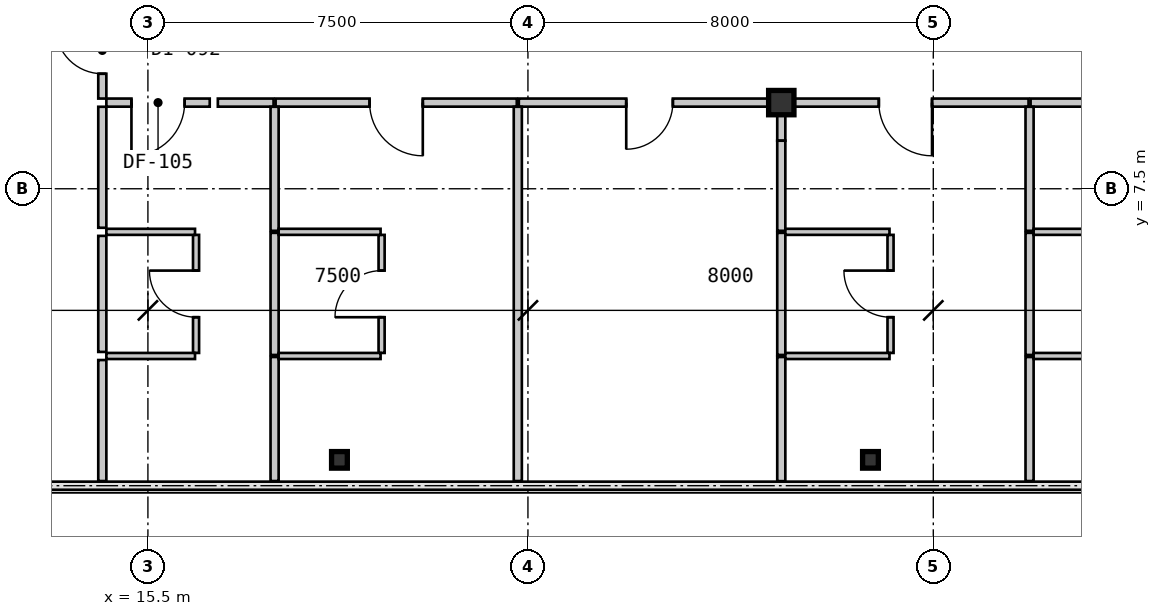
"""IFC4 building model, lengths in metres.
Left out: names, types, materials, properties, quantities, classifications, styles, units other than length and angle.
Written with IfcOpenShell. Run it as: python <this file> out.ifc"""

import sys

from ifc_helpers import new_model, si_unit, direction, frame, frame_2d, origin, origin_2d, place, context, subcontext, project, spatial, rectangle, i_section, extrude, source, transform, mapped, element, fill, save


model = new_model("IFC4")
c1 = context("Model", 3, precision=1e-05, world=origin(), true_north=direction((0.0, 1.0)))
c2 = subcontext(c1, "Body", "Model", "MODEL_VIEW")
j1 = project(units=[si_unit("LENGTHUNIT", "METRE"), si_unit("PLANEANGLEUNIT", "RADIAN")], contexts=[c1])
p1 = place(None, origin())
s1 = spatial("IfcSite", under=j1, at=p1, CompositionType="ELEMENT")
p2 = place(p1, origin())
s2 = spatial("IfcBuilding", under=s1, at=p2, CompositionType="ELEMENT")
p3 = place(p2, frame((0.0, 0.0, 19.95)))
s3 = spatial("IfcBuildingStorey", under=s2, at=p3, CompositionType="ELEMENT", Elevation=19.95)
m1 = source(origin(), c2, "Body", "SweptSolid", [
    extrude(i_section(OverallWidth=0.5, OverallDepth=0.48, WebThickness=0.028, FlangeThickness=0.044, at=origin_2d()), origin(), (0.0, 0.0, 1.0), 3.15),
])
p4 = place(p3, frame((28.0, 9.2, 0.0), z_axis=(0.0, 0.0, 1.0), x_axis=(1.0, 0.0, 0.0)))
e1 = element("IfcColumn", 1, at=p4, inside=s3, PredefinedType="COLUMN", context=c2, shape_type="MappedRepresentation", body=[
    mapped(m1, transform((0.0, 0.0, 0.0), scale=1.0)),
])
m2 = source(origin(), c2, "Body", "SweptSolid", [
    extrude(i_section(OverallWidth=0.311, OverallDepth=0.327, WebThickness=0.016, FlangeThickness=0.025, at=origin_2d()), origin(), (0.0, 0.0, 1.0), 3.15),
])
for number, where, z_axis, x_axis in (
    (2, (19.28, 2.15, 0.0), (0.0, 0.0, 1.0), (1.0, 0.0, 0.0)),
    (3, (29.76, 2.15, 0.0), (0.0, 0.0, 1.0), (1.0, 0.0, 0.0)),
):
    element("IfcColumn", number, at=place(p3, frame(where, z_axis=z_axis, x_axis=x_axis)), inside=s3, PredefinedType="COLUMN", context=c2, shape_type="MappedRepresentation", body=[
        mapped(m2, transform((0.0, 0.0, 0.0), scale=1.0)),
    ])
m3 = source(origin(), c2, "Body", "SweptSolid", [
    extrude(rectangle(XDim=2.04, YDim=0.16, at=frame_2d((1.02, 0.0))), origin(), (0.0, 0.0, 1.0), 2.93),
])
p5 = place(p3, frame((16.72, 9.2, 0.0), z_axis=(0.0, 0.0, 1.0), x_axis=(-1.0, 0.0, 0.0)))
e4 = element("IfcWall", 4, at=p5, inside=s3, PredefinedType="PARTITIONING", context=c2, shape_type="MappedRepresentation", body=[
    mapped(m3, transform((0.0, 0.0, 0.0), scale=1.0)),
])
m4 = source(origin(), c2, "Body", "SweptSolid", [
    extrude(rectangle(XDim=1.05, YDim=2.1, at=frame_2d((0.525, 1.05))), frame((0.0, 0.09, 0.0), z_axis=(0.0, -1.0, 0.0), x_axis=(1.0, 0.0, 0.0)), (0.0, 0.0, 1.0), 0.18),
])
p6 = place(p5, frame((0.495, 0.0, 0.0)))
e5 = element("IfcOpeningElement", 5, at=p6, cuts=e4, PredefinedType="OPENING", context=c2, shape_type="MappedRepresentation", body=[
    mapped(m4, transform((0.0, 0.0, 0.0), scale=1.0)),
])
m5 = source(origin(), c2, "Body", "SweptSolid", [
    extrude(rectangle(XDim=1.9, YDim=0.16, at=frame_2d((0.95, 0.0))), origin(), (0.0, 0.0, 1.0), 2.93),
])
p7 = place(p3, frame((14.6, 9.28, 0.0), z_axis=(0.0, 0.0, 1.0), x_axis=(0.0, 1.0, 0.0)))
e6 = element("IfcWall", 6, at=p7, inside=s3, PredefinedType="PARTITIONING", context=c2, shape_type="MappedRepresentation", body=[
    mapped(m5, transform((0.0, 0.0, 0.0), scale=1.0)),
])
m6 = source(origin(), c2, "Body", "SweptSolid", [
    extrude(rectangle(XDim=0.92, YDim=2.1, at=frame_2d((0.46, 1.05))), frame((0.0, 0.09, 0.0), z_axis=(0.0, -1.0, 0.0), x_axis=(1.0, 0.0, 0.0)), (0.0, 0.0, 1.0), 0.18),
])
p8 = place(p7, frame((0.49, 0.0, 0.0)))
e7 = element("IfcOpeningElement", 7, at=p8, cuts=e6, PredefinedType="OPENING", context=c2, shape_type="MappedRepresentation", body=[
    mapped(m6, transform((0.0, 0.0, 0.0), scale=1.0)),
])
m7 = source(origin(), c2, "Body", "SweptSolid", [
    extrude(rectangle(XDim=1.1, YDim=0.16, at=frame_2d((0.55, 0.0))), origin(), (0.0, 0.0, 1.0), 2.93),
])
p9 = place(p3, frame((17.98, 9.2, 0.0), z_axis=(0.0, 0.0, 1.0), x_axis=(-1.0, 0.0, 0.0)))
e8 = element("IfcWall", 8, at=p9, inside=s3, PredefinedType="PARTITIONING", context=c2, shape_type="MappedRepresentation", body=[
    mapped(m7, transform((0.0, 0.0, 0.0), scale=1.0)),
])
m8 = source(origin(), c2, "Body", "SweptSolid", [
    extrude(rectangle(XDim=4.76, YDim=0.16, at=frame_2d((2.38, 0.0))), origin(), (0.0, 0.0, 1.0), 2.93),
])
p10 = place(p3, frame((22.78, 9.2, 0.0), z_axis=(0.0, 0.0, 1.0), x_axis=(-1.0, 0.0, 0.0)))
e9 = element("IfcWall", 9, at=p10, inside=s3, PredefinedType="PARTITIONING", context=c2, shape_type="MappedRepresentation", body=[
    mapped(m8, transform((0.0, 0.0, 0.0), scale=1.0)),
])
p11 = place(p10, frame((1.855, 0.0, 0.0)))
e10 = element("IfcOpeningElement", 10, at=p11, cuts=e9, PredefinedType="OPENING", context=c2, shape_type="MappedRepresentation", body=[
    mapped(m4, transform((0.0, 0.0, 0.0), scale=1.0)),
])
m9 = source(origin(), c2, "Body", "SweptSolid", [
    extrude(rectangle(XDim=5.159, YDim=0.16, at=frame_2d((2.58, 0.0))), origin(), (0.0, 0.0, 1.0), 2.93),
])
p12 = place(p3, frame((27.98, 9.2, 0.0), z_axis=(0.0, 0.0, 1.0), x_axis=(-1.0, 0.0, 0.0)))
e11 = element("IfcWall", 11, at=p12, inside=s3, PredefinedType="PARTITIONING", context=c2, shape_type="MappedRepresentation", body=[
    mapped(m9, transform((0.0, 0.0, 0.0), scale=1.0)),
])
p13 = place(p12, frame((2.12, 0.0, 0.0)))
e12 = element("IfcOpeningElement", 12, at=p13, cuts=e11, PredefinedType="OPENING", context=c2, shape_type="MappedRepresentation", body=[
    mapped(m6, transform((0.0, 0.0, 0.0), scale=1.0)),
])
m10 = source(origin(), c2, "Body", "SweptSolid", [
    extrude(rectangle(XDim=4.859, YDim=0.16, at=frame_2d((2.43, 0.0))), origin(), (0.0, 0.0, 1.0), 2.328),
])
p14 = place(p3, frame((32.88, 9.2, 0.0), z_axis=(0.0, 0.0, 1.0), x_axis=(-1.0, 0.0, 0.0)))
e13 = element("IfcWall", 13, at=p14, inside=s3, PredefinedType="PARTITIONING", context=c2, shape_type="MappedRepresentation", body=[
    mapped(m10, transform((0.0, 0.0, 0.0), scale=1.0)),
])
p15 = place(p14, frame((1.905, 0.0, 0.0)))
e14 = element("IfcOpeningElement", 14, at=p15, cuts=e13, PredefinedType="OPENING", context=c2, shape_type="MappedRepresentation", body=[
    mapped(m4, transform((0.0, 0.0, 0.0), scale=1.0)),
])
m11 = source(origin(), c2, "Body", "SweptSolid", [
    extrude(rectangle(XDim=4.659, YDim=0.16, at=frame_2d((2.33, 0.0))), origin(), (0.0, 0.0, 1.0), 2.328),
])
p16 = place(p3, frame((37.58, 9.2, 0.0), z_axis=(0.0, 0.0, 1.0), x_axis=(-1.0, 0.0, 0.0)))
e15 = element("IfcWall", 15, at=p16, inside=s3, PredefinedType="PARTITIONING", context=c2, shape_type="MappedRepresentation", body=[
    mapped(m11, transform((0.0, 0.0, 0.0), scale=1.0)),
])
p17 = place(p16, frame((1.805, 0.0, 0.0)))
e16 = element("IfcOpeningElement", 16, at=p17, cuts=e15, PredefinedType="OPENING", context=c2, shape_type="MappedRepresentation", body=[
    mapped(m4, transform((0.0, 0.0, 0.0), scale=1.0)),
])
m12 = source(origin(), c2, "Body", "SweptSolid", [
    extrude(rectangle(XDim=2.33, YDim=0.12, at=frame_2d((1.165, 0.0))), origin(), (0.0, 0.0, 1.0), 2.93),
])
p18 = place(p3, frame((16.45, 4.26, 0.0), z_axis=(0.0, 0.0, 1.0), x_axis=(0.0, 1.0, 0.0)))
e17 = element("IfcWall", 17, at=p18, inside=s3, PredefinedType="PARTITIONING", context=c2, shape_type="MappedRepresentation", body=[
    mapped(m12, transform((0.0, 0.0, 0.0), scale=1.0)),
])
m13 = source(origin(), c2, "Body", "SweptSolid", [
    extrude(rectangle(XDim=0.92, YDim=2.1, at=frame_2d((0.46, 1.05))), frame((0.0, 0.07, 0.0), z_axis=(0.0, -1.0, 0.0), x_axis=(1.0, 0.0, 0.0)), (0.0, 0.0, 1.0), 0.14),
])
p19 = place(p18, frame((0.705, 0.0, 0.0)))
e18 = element("IfcOpeningElement", 18, at=p19, cuts=e17, PredefinedType="OPENING", context=c2, shape_type="MappedRepresentation", body=[
    mapped(m13, transform((0.0, 0.0, 0.0), scale=1.0)),
])
m14 = source(origin(), c2, "Body", "SweptSolid", [
    extrude(rectangle(XDim=1.75, YDim=0.12, at=frame_2d((0.875, 0.0))), origin(), (0.0, 0.0, 1.0), 2.93),
])
for number, where, z_axis, x_axis in (
    (19, (14.68, 4.2, 0.0), (0.0, 0.0, 1.0), (1.0, 0.0, 0.0)),
    (20, (16.43, 6.65, 0.0), (0.0, 0.0, 1.0), (-1.0, 0.0, 0.0)),
):
    element("IfcWall", number, at=place(p3, frame(where, z_axis=z_axis, x_axis=x_axis)), inside=s3, PredefinedType="PARTITIONING", context=c2, shape_type="MappedRepresentation", body=[
        mapped(m14, transform((0.0, 0.0, 0.0), scale=1.0)),
    ])
m15 = source(origin(), c2, "Body", "SweptSolid", [
    extrude(rectangle(XDim=2.448, YDim=0.16, at=frame_2d((1.224, 0.0))), origin(), (0.0, 0.0, 1.0), 2.93),
])
for number, where, z_axis, x_axis in (
    (21, (18.0, 4.18, 0.0), (0.0, 0.0, 1.0), (0.0, -1.0, 0.0)),
    (22, (18.0, 9.118, 0.0), (0.0, 0.0, 1.0), (0.0, -1.0, 0.0)),
):
    element("IfcWall", number, at=place(p3, frame(where, z_axis=z_axis, x_axis=x_axis)), inside=s3, PredefinedType="PARTITIONING", context=c2, shape_type="MappedRepresentation", body=[
        mapped(m15, transform((0.0, 0.0, 0.0), scale=1.0)),
    ])
m16 = source(origin(), c2, "Body", "SweptSolid", [
    extrude(rectangle(XDim=2.41, YDim=0.16, at=frame_2d((1.205, 0.0))), origin(), (0.0, 0.0, 1.0), 2.93),
])
p20 = place(p3, frame((18.0, 6.63, 0.0), z_axis=(0.0, 0.0, 1.0), x_axis=(0.0, -1.0, 0.0)))
e23 = element("IfcWall", 23, at=p20, inside=s3, PredefinedType="PARTITIONING", context=c2, shape_type="MappedRepresentation", body=[
    mapped(m16, transform((0.0, 0.0, 0.0), scale=1.0)),
])
m17 = source(origin(), c2, "Body", "SweptSolid", [
    extrude(rectangle(XDim=2.388, YDim=0.16, at=frame_2d((1.194, 0.0))), origin(), (0.0, 0.0, 1.0), 2.93),
])
p21 = place(p3, frame((14.6, 1.732, 0.0), z_axis=(0.0, 0.0, 1.0), x_axis=(0.0, 1.0, 0.0)))
e24 = element("IfcWall", 24, at=p21, inside=s3, PredefinedType="PARTITIONING", context=c2, shape_type="MappedRepresentation", body=[
    mapped(m17, transform((0.0, 0.0, 0.0), scale=1.0)),
])
m18 = source(origin(), c2, "Body", "SweptSolid", [
    extrude(rectangle(XDim=2.388, YDim=0.16, at=frame_2d((1.194, 0.0))), origin(), (0.0, 0.0, 1.0), 2.93),
])
p22 = place(p3, frame((14.6, 6.73, 0.0), z_axis=(0.0, 0.0, 1.0), x_axis=(0.0, 1.0, 0.0)))
e25 = element("IfcWall", 25, at=p22, inside=s3, PredefinedType="PARTITIONING", context=c2, shape_type="MappedRepresentation", body=[
    mapped(m18, transform((0.0, 0.0, 0.0), scale=1.0)),
])
m19 = source(origin(), c2, "Body", "SweptSolid", [
    extrude(rectangle(XDim=2.29, YDim=0.16, at=frame_2d((1.145, 0.0))), origin(), (0.0, 0.0, 1.0), 2.93),
])
p23 = place(p3, frame((14.6, 4.28, 0.0), z_axis=(0.0, 0.0, 1.0), x_axis=(0.0, 1.0, 0.0)))
e26 = element("IfcWall", 26, at=p23, inside=s3, PredefinedType="PARTITIONING", context=c2, shape_type="MappedRepresentation", body=[
    mapped(m19, transform((0.0, 0.0, 0.0), scale=1.0)),
])
p24 = place(p3, frame((20.112, 4.26, 0.0), z_axis=(0.0, 0.0, 1.0), x_axis=(0.0, 1.0, 0.0)))
e27 = element("IfcWall", 27, at=p24, inside=s3, PredefinedType="PARTITIONING", context=c2, shape_type="MappedRepresentation", body=[
    mapped(m12, transform((0.0, 0.0, 0.0), scale=1.0)),
])
p25 = place(p24, frame((0.705, 0.0, 0.0)))
e28 = element("IfcOpeningElement", 28, at=p25, cuts=e27, PredefinedType="OPENING", context=c2, shape_type="MappedRepresentation", body=[
    mapped(m13, transform((0.0, 0.0, 0.0), scale=1.0)),
])
m20 = source(origin(), c2, "Body", "SweptSolid", [
    extrude(rectangle(XDim=2.012, YDim=0.12, at=frame_2d((1.006, 0.0))), origin(), (0.0, 0.0, 1.0), 2.93),
])
for number, where, z_axis, x_axis in (
    (29, (18.08, 4.2, 0.0), (0.0, 0.0, 1.0), (1.0, 0.0, 0.0)),
    (30, (20.092, 6.65, 0.0), (0.0, 0.0, 1.0), (-1.0, 0.0, 0.0)),
):
    element("IfcWall", number, at=place(p3, frame(where, z_axis=z_axis, x_axis=x_axis)), inside=s3, PredefinedType="PARTITIONING", context=c2, shape_type="MappedRepresentation", body=[
        mapped(m20, transform((0.0, 0.0, 0.0), scale=1.0)),
    ])
m21 = source(origin(), c2, "Body", "SweptSolid", [
    extrude(rectangle(XDim=7.386, YDim=0.16, at=frame_2d((3.693, 0.0))), origin(), (0.0, 0.0, 1.0), 2.93),
])
p26 = place(p3, frame((22.8, 9.118, 0.0), z_axis=(0.0, 0.0, 1.0), x_axis=(0.0, -1.0, 0.0)))
e31 = element("IfcWall", 31, at=p26, inside=s3, PredefinedType="PARTITIONING", context=c2, shape_type="MappedRepresentation", body=[
    mapped(m21, transform((0.0, 0.0, 0.0), scale=1.0)),
])
m22 = source(origin(), c2, "Body", "SweptSolid", [
    extrude(rectangle(XDim=2.45, YDim=0.16, at=frame_2d((1.225, 0.0))), origin(), (0.0, 0.0, 1.0), 2.93),
])
p27 = place(p3, frame((28.0, 4.18, 0.0), z_axis=(0.0, 0.0, 1.0), x_axis=(0.0, -1.0, 0.0)))
e32 = element("IfcWall", 32, at=p27, inside=s3, PredefinedType="PARTITIONING", context=c2, shape_type="MappedRepresentation", body=[
    mapped(m22, transform((0.0, 0.0, 0.0), scale=1.0)),
])
m23 = source(origin(), c2, "Body", "SweptSolid", [
    extrude(rectangle(XDim=0.672, YDim=0.16, at=frame_2d((0.336, 0.0))), origin(), (0.0, 0.0, 1.0), 2.397),
])
p28 = place(p3, frame((28.0, 9.12, 0.0), z_axis=(0.0, 0.0, 1.0), x_axis=(0.0, -1.0, 0.0)))
e33 = element("IfcWall", 33, at=p28, inside=s3, PredefinedType="PARTITIONING", context=c2, shape_type="MappedRepresentation", body=[
    mapped(m23, transform((0.0, 0.0, 0.0), scale=1.0)),
])
m24 = source(origin(), c2, "Body", "SweptSolid", [
    extrude(rectangle(XDim=1.778, YDim=0.16, at=frame_2d((0.889, 0.0))), origin(), (0.0, 0.0, 1.0), 2.93),
])
p29 = place(p3, frame((28.0, 8.448, 0.0), z_axis=(0.0, 0.0, 1.0), x_axis=(0.0, -1.0, 0.0)))
e34 = element("IfcWall", 34, at=p29, inside=s3, PredefinedType="PARTITIONING", context=c2, shape_type="MappedRepresentation", body=[
    mapped(m24, transform((0.0, 0.0, 0.0), scale=1.0)),
])
p30 = place(p3, frame((28.0, 6.63, 0.0), z_axis=(0.0, 0.0, 1.0), x_axis=(0.0, -1.0, 0.0)))
e35 = element("IfcWall", 35, at=p30, inside=s3, PredefinedType="PARTITIONING", context=c2, shape_type="MappedRepresentation", body=[
    mapped(m16, transform((0.0, 0.0, 0.0), scale=1.0)),
])
p31 = place(p3, frame((30.156, 4.26, 0.0), z_axis=(0.0, 0.0, 1.0), x_axis=(0.0, 1.0, 0.0)))
e36 = element("IfcWall", 36, at=p31, inside=s3, PredefinedType="PARTITIONING", context=c2, shape_type="MappedRepresentation", body=[
    mapped(m12, transform((0.0, 0.0, 0.0), scale=1.0)),
])
p32 = place(p31, frame((0.705, 0.0, 0.0)))
e37 = element("IfcOpeningElement", 37, at=p32, cuts=e36, PredefinedType="OPENING", context=c2, shape_type="MappedRepresentation", body=[
    mapped(m13, transform((0.0, 0.0, 0.0), scale=1.0)),
])
m25 = source(origin(), c2, "Body", "SweptSolid", [
    extrude(rectangle(XDim=2.056, YDim=0.12, at=frame_2d((1.028, 0.0))), origin(), (0.0, 0.0, 1.0), 2.93),
])
for number, where, z_axis, x_axis in (
    (38, (28.08, 4.2, 0.0), (0.0, 0.0, 1.0), (1.0, 0.0, 0.0)),
    (39, (30.136, 6.65, 0.0), (0.0, 0.0, 1.0), (-1.0, 0.0, 0.0)),
):
    element("IfcWall", number, at=place(p3, frame(where, z_axis=z_axis, x_axis=x_axis)), inside=s3, PredefinedType="PARTITIONING", context=c2, shape_type="MappedRepresentation", body=[
        mapped(m25, transform((0.0, 0.0, 0.0), scale=1.0)),
    ])
for number, where, z_axis, x_axis in (
    (40, (32.9, 4.18, 0.0), (0.0, 0.0, 1.0), (0.0, -1.0, 0.0)),
    (41, (32.9, 9.118, 0.0), (0.0, 0.0, 1.0), (0.0, -1.0, 0.0)),
):
    element("IfcWall", number, at=place(p3, frame(where, z_axis=z_axis, x_axis=x_axis)), inside=s3, PredefinedType="PARTITIONING", context=c2, shape_type="MappedRepresentation", body=[
        mapped(m15, transform((0.0, 0.0, 0.0), scale=1.0)),
    ])
p33 = place(p3, frame((32.9, 6.63, 0.0), z_axis=(0.0, 0.0, 1.0), x_axis=(0.0, -1.0, 0.0)))
e42 = element("IfcWall", 42, at=p33, inside=s3, PredefinedType="PARTITIONING", context=c2, shape_type="MappedRepresentation", body=[
    mapped(m16, transform((0.0, 0.0, 0.0), scale=1.0)),
])
m26 = source(origin(), c2, "Body", "SweptSolid", [
    extrude(rectangle(XDim=1.968, YDim=0.12, at=frame_2d((0.984, 0.0))), origin(), (0.0, 0.0, 1.0), 2.93),
])
for number, where, z_axis, x_axis in (
    (43, (32.98, 4.2, 0.0), (0.0, 0.0, 1.0), (1.0, 0.0, 0.0)),
    (44, (34.948, 6.65, 0.0), (0.0, 0.0, 1.0), (-1.0, 0.0, 0.0)),
):
    element("IfcWall", number, at=place(p3, frame(where, z_axis=z_axis, x_axis=x_axis)), inside=s3, PredefinedType="PARTITIONING", context=c2, shape_type="MappedRepresentation", body=[
        mapped(m26, transform((0.0, 0.0, 0.0), scale=1.0)),
    ])
m27 = source(origin(), c2, "Body", "SweptSolid", [
    extrude(rectangle(XDim=1.05, YDim=2.1, at=frame_2d((0.525, 1.05))), frame((0.0, 0.025, 0.0), z_axis=(0.0, -1.0, 0.0), x_axis=(1.0, 0.0, 0.0)), (0.0, 0.0, 1.0), 0.05),
])
p34 = place(p6, origin())
e45 = element("IfcDoor", 45, at=p34, inside=s3, OperationType="SINGLE_SWING_RIGHT", PredefinedType="DOOR", context=c2, shape_type="MappedRepresentation", body=[
    mapped(m27, transform((0.0, 0.0, 0.0), scale=1.0)),
])
fill(e5, e45)
m28 = source(origin(), c2, "Body", "SweptSolid", [
    extrude(rectangle(XDim=0.92, YDim=2.1, at=frame_2d((0.46, 1.05))), frame((0.0, 0.025, 0.0), z_axis=(0.0, -1.0, 0.0), x_axis=(1.0, 0.0, 0.0)), (0.0, 0.0, 1.0), 0.05),
])
p35 = place(p8, origin())
e46 = element("IfcDoor", 46, at=p35, inside=s3, OperationType="SINGLE_SWING_RIGHT", PredefinedType="DOOR", context=c2, shape_type="MappedRepresentation", body=[
    mapped(m28, transform((0.0, 0.0, 0.0), scale=1.0)),
])
fill(e7, e46)
p36 = place(p11, origin())
e47 = element("IfcDoor", 47, at=p36, inside=s3, OperationType="SINGLE_SWING_LEFT", PredefinedType="DOOR", context=c2, shape_type="MappedRepresentation", body=[
    mapped(m27, transform((0.0, 0.0, 0.0), scale=1.0)),
])
fill(e10, e47)
p37 = place(p13, origin())
e48 = element("IfcDoor", 48, at=p37, inside=s3, OperationType="SINGLE_SWING_RIGHT", PredefinedType="DOOR", context=c2, shape_type="MappedRepresentation", body=[
    mapped(m28, transform((0.0, 0.0, 0.0), scale=1.0)),
])
fill(e12, e48)
p38 = place(p15, origin())
e49 = element("IfcDoor", 49, at=p38, inside=s3, OperationType="SINGLE_SWING_LEFT", PredefinedType="DOOR", context=c2, shape_type="MappedRepresentation", body=[
    mapped(m27, transform((0.0, 0.0, 0.0), scale=1.0)),
])
fill(e14, e49)
p39 = place(p19, origin())
e50 = element("IfcDoor", 50, at=p39, inside=s3, OperationType="SINGLE_SWING_RIGHT", PredefinedType="DOOR", context=c2, shape_type="MappedRepresentation", body=[
    mapped(m28, transform((0.0, 0.0, 0.0), scale=1.0)),
])
fill(e18, e50)
p40 = place(p25, origin())
e51 = element("IfcDoor", 51, at=p40, inside=s3, OperationType="SINGLE_SWING_LEFT", PredefinedType="DOOR", context=c2, shape_type="MappedRepresentation", body=[
    mapped(m28, transform((0.0, 0.0, 0.0), scale=1.0)),
])
fill(e28, e51)
p41 = place(p32, origin())
e52 = element("IfcDoor", 52, at=p41, inside=s3, OperationType="SINGLE_SWING_RIGHT", PredefinedType="DOOR", context=c2, shape_type="MappedRepresentation", body=[
    mapped(m28, transform((0.0, 0.0, 0.0), scale=1.0)),
])
fill(e37, e52)
save(model, sys.argv[1])
